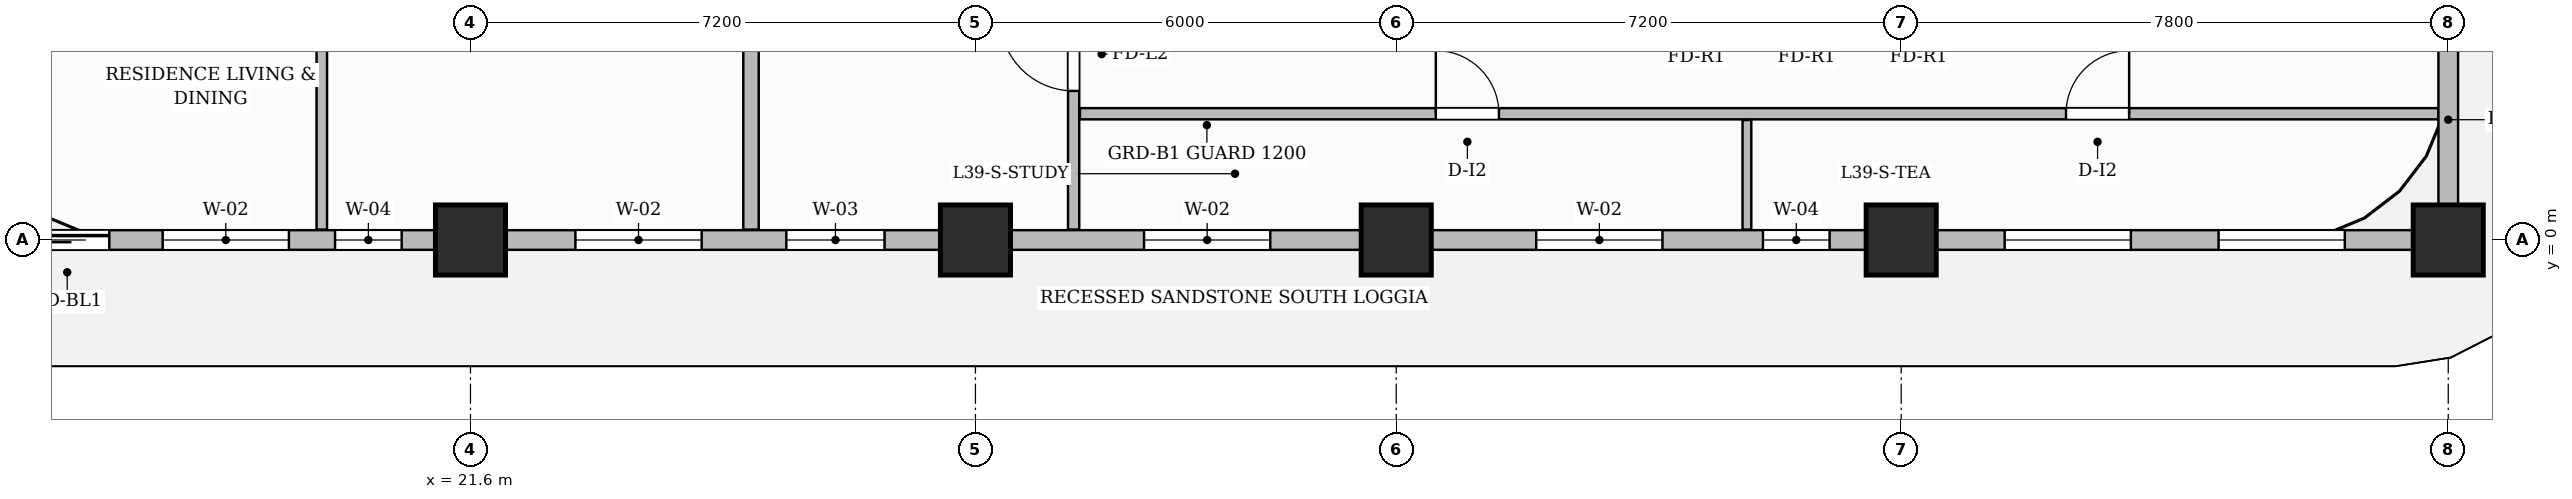
"""IFC4 building model, lengths in metres.
Left out: names, types, materials, properties, quantities, classifications, styles, units other than length and angle.
Written with IfcOpenShell. Run it as: python <this file> out.ifc"""

import sys

from ifc_helpers import new_model, si_unit, direction, frame, frame_2d, origin, origin_2d, place, context, subcontext, project, spatial, rectangle, extrude, source, transform, mapped, element, fill, save


model = new_model("IFC4")
c1 = context("Model", 3, precision=1e-05, world=origin(), true_north=direction((0.0, 1.0)))
c2 = subcontext(c1, "Body", "Model", "MODEL_VIEW")
j1 = project(units=[si_unit("LENGTHUNIT", "METRE"), si_unit("PLANEANGLEUNIT", "RADIAN")], contexts=[c1])
p1 = place(None, origin())
s1 = spatial("IfcSite", under=j1, at=p1, CompositionType="ELEMENT")
p2 = place(p1, origin())
s2 = spatial("IfcBuilding", under=s1, at=p2, CompositionType="ELEMENT")
p3 = place(p2, frame((0.0, 0.0, 158.0)))
s3 = spatial("IfcBuildingStorey", under=s2, at=p3, CompositionType="ELEMENT", Elevation=158.0)
m1 = source(origin(), c2, "Body", "SweptSolid", [
    extrude(rectangle(XDim=1.0, YDim=1.0, at=origin_2d()), origin(), (0.0, 0.0, 1.0), 3.85),
])
for number, where, z_axis, x_axis in (
    (1, (21.6, 0.0, 0.0), (0.0, 0.0, 1.0), (1.0, 0.0, 0.0)),
    (2, (28.8, 0.0, 0.0), (0.0, 0.0, 1.0), (1.0, 0.0, 0.0)),
    (3, (34.8, 0.0, 0.0), (0.0, 0.0, 1.0), (1.0, 0.0, 0.0)),
    (4, (42.0, 0.0, 0.0), (0.0, 0.0, 1.0), (1.0, 0.0, 0.0)),
    (5, (49.8, 0.0, 0.0), (0.0, 0.0, 1.0), (1.0, 0.0, 0.0)),
):
    element("IfcColumn", number, at=place(p3, frame(where, z_axis=z_axis, x_axis=x_axis)), inside=s3, PredefinedType="COLUMN", context=c2, shape_type="MappedRepresentation", body=[
        mapped(m1, transform((0.0, 0.0, 0.0), scale=1.0)),
    ])
p4 = place(p3, frame((30.2, 0.148, 0.0), z_axis=(0.0, 0.0, 1.0), x_axis=(0.0, 1.0, 0.0)))
e6 = element("IfcWall", 6, at=p4, inside=s3, PredefinedType="PARTITIONING", context=c2, shape_type="SweptSolid", body=[
    extrude(rectangle(XDim=9.712, YDim=0.16, at=frame_2d((4.856, 0.0))), origin(), (0.0, 0.0, 1.0), 3.6),
])
p5 = place(p4, frame((1.977, 0.0, 0.0)))
e7 = element("IfcOpeningElement", 7, at=p5, cuts=e6, PredefinedType="OPENING", context=c2, shape_type="SweptSolid", body=[
    extrude(rectangle(XDim=1.05, YDim=2.15, at=frame_2d((0.525, 1.075))), frame((0.0, 0.09, 0.0), z_axis=(0.0, -1.0, 0.0), x_axis=(1.0, 0.0, 0.0)), (0.0, 0.0, 1.0), 0.18),
])
p6 = place(p3, frame((30.29, 1.8, 0.0), z_axis=(0.0, 0.0, 1.0), x_axis=(1.0, 0.0, 0.0)))
e8 = element("IfcWall", 8, at=p6, inside=s3, PredefinedType="PARTITIONING", context=c2, shape_type="SweptSolid", body=[
    extrude(rectangle(XDim=19.37, YDim=0.16, at=frame_2d((9.685, 0.0))), origin(), (0.0, 0.0, 1.0), 3.6),
])
p7 = place(p6, frame((5.074, 0.0, 0.0)))
e9 = element("IfcOpeningElement", 9, at=p7, cuts=e8, PredefinedType="OPENING", context=c2, shape_type="SweptSolid", body=[
    extrude(rectangle(XDim=0.9, YDim=2.15, at=frame_2d((0.45, 1.075))), frame((0.0, 0.09, 0.0), z_axis=(0.0, -1.0, 0.0), x_axis=(1.0, 0.0, 0.0)), (0.0, 0.0, 1.0), 0.18),
])
p8 = place(p6, frame((14.06, 0.0, 0.0)))
e10 = element("IfcOpeningElement", 10, at=p8, cuts=e8, PredefinedType="OPENING", context=c2, shape_type="SweptSolid", body=[
    extrude(rectangle(XDim=0.9, YDim=2.15, at=frame_2d((0.45, 1.075))), frame((0.0, 0.09, 0.0), z_axis=(0.0, -1.0, 0.0), x_axis=(1.0, 0.0, 0.0)), (0.0, 0.0, 1.0), 0.18),
])
p9 = place(p3, frame((39.8, 0.148, 0.0), z_axis=(0.0, 0.0, 1.0), x_axis=(0.0, 1.0, 0.0)))
e11 = element("IfcWall", 11, at=p9, inside=s3, PredefinedType="PARTITIONING", context=c2, shape_type="SweptSolid", body=[
    extrude(rectangle(XDim=1.562, YDim=0.125, at=frame_2d((0.781, 0.0))), origin(), (0.0, 0.0, 1.0), 3.6),
])
p10 = place(p3, frame((25.6, 0.148, 0.0), z_axis=(0.0, 0.0, 1.0), x_axis=(0.0, 1.0, 0.0)))
e12 = element("IfcWall", 12, at=p10, inside=s3, PredefinedType="PARTITIONING", context=c2, shape_type="SweptSolid", body=[
    extrude(rectangle(XDim=9.712, YDim=0.22, at=frame_2d((4.856, 0.0))), origin(), (0.0, 0.0, 1.0), 3.6),
])
p11 = place(p3, frame((19.48, 0.148, 0.0), z_axis=(0.0, 0.0, 1.0), x_axis=(0.0, 1.0, 0.0)))
e13 = element("IfcWall", 13, at=p11, inside=s3, PredefinedType="PARTITIONING", context=c2, shape_type="SweptSolid", body=[
    extrude(rectangle(XDim=9.712, YDim=0.15, at=frame_2d((4.856, 0.0))), origin(), (0.0, 0.0, 1.0), 3.6),
])
p12 = place(p11, frame((8.277, 0.0, 0.0)))
e14 = element("IfcOpeningElement", 14, at=p12, cuts=e13, PredefinedType="OPENING", context=c2, shape_type="SweptSolid", body=[
    extrude(rectangle(XDim=0.9, YDim=2.15, at=frame_2d((0.45, 1.075))), frame((0.0, 0.085, 0.0), z_axis=(0.0, -1.0, 0.0), x_axis=(1.0, 0.0, 0.0)), (0.0, 0.0, 1.0), 0.17),
])
p13 = place(p3, frame((14.4, 0.0, 0.0), z_axis=(0.0, 0.0, 1.0), x_axis=(1.0, 0.0, 0.0)))
e15 = element("IfcWall", 15, at=p13, inside=s3, PredefinedType="SOLIDWALL", context=c2, shape_type="SweptSolid", body=[
    extrude(rectangle(XDim=35.4, YDim=0.28, at=frame_2d((17.7, 0.0))), origin(), (0.0, 0.0, 1.0), 3.085),
])
p14 = place(p13, frame((0.85, 0.0, 0.0)))
e16 = element("IfcOpeningElement", 16, at=p14, cuts=e15, PredefinedType="OPENING", context=c2, shape_type="SweptSolid", body=[
    extrude(rectangle(XDim=1.2, YDim=2.2, at=frame_2d((0.6, 1.1))), frame((0.0, 0.15, 0.0), z_axis=(0.0, -1.0, 0.0), x_axis=(1.0, 0.0, 0.0)), (0.0, 0.0, 1.0), 0.3),
])
p15 = place(p13, frame((2.811, 0.0, 0.8)))
e17 = element("IfcOpeningElement", 17, at=p15, cuts=e15, PredefinedType="OPENING", context=c2, shape_type="SweptSolid", body=[
    extrude(rectangle(XDim=1.8, YDim=1.85, at=frame_2d((0.9, 0.925))), frame((0.0, 0.15, 0.0), z_axis=(0.0, -1.0, 0.0), x_axis=(1.0, 0.0, 0.0)), (0.0, 0.0, 1.0), 0.3),
])
p16 = place(p13, frame((5.269, 0.0, 0.8)))
e18 = element("IfcOpeningElement", 18, at=p16, cuts=e15, PredefinedType="OPENING", context=c2, shape_type="SweptSolid", body=[
    extrude(rectangle(XDim=0.95, YDim=1.75, at=frame_2d((0.475, 0.875))), frame((0.0, 0.15, 0.0), z_axis=(0.0, -1.0, 0.0), x_axis=(1.0, 0.0, 0.0)), (0.0, 0.0, 1.0), 0.3),
])
p17 = place(p13, frame((8.696, 0.0, 0.8)))
e19 = element("IfcOpeningElement", 19, at=p17, cuts=e15, PredefinedType="OPENING", context=c2, shape_type="SweptSolid", body=[
    extrude(rectangle(XDim=1.8, YDim=1.85, at=frame_2d((0.9, 0.925))), frame((0.0, 0.15, 0.0), z_axis=(0.0, -1.0, 0.0), x_axis=(1.0, 0.0, 0.0)), (0.0, 0.0, 1.0), 0.3),
])
p18 = place(p13, frame((11.704, 0.0, 0.8)))
e20 = element("IfcOpeningElement", 20, at=p18, cuts=e15, PredefinedType="OPENING", context=c2, shape_type="SweptSolid", body=[
    extrude(rectangle(XDim=1.4, YDim=1.85, at=frame_2d((0.7, 0.925))), frame((0.0, 0.15, 0.0), z_axis=(0.0, -1.0, 0.0), x_axis=(1.0, 0.0, 0.0)), (0.0, 0.0, 1.0), 0.3),
])
p19 = place(p13, frame((16.804, 0.0, 0.8)))
e21 = element("IfcOpeningElement", 21, at=p19, cuts=e15, PredefinedType="OPENING", context=c2, shape_type="SweptSolid", body=[
    extrude(rectangle(XDim=1.8, YDim=1.85, at=frame_2d((0.9, 0.925))), frame((0.0, 0.15, 0.0), z_axis=(0.0, -1.0, 0.0), x_axis=(1.0, 0.0, 0.0)), (0.0, 0.0, 1.0), 0.3),
])
p20 = place(p13, frame((22.396, 0.0, 0.8)))
e22 = element("IfcOpeningElement", 22, at=p20, cuts=e15, PredefinedType="OPENING", context=c2, shape_type="SweptSolid", body=[
    extrude(rectangle(XDim=1.8, YDim=1.85, at=frame_2d((0.9, 0.925))), frame((0.0, 0.15, 0.0), z_axis=(0.0, -1.0, 0.0), x_axis=(1.0, 0.0, 0.0)), (0.0, 0.0, 1.0), 0.3),
])
p21 = place(p13, frame((25.629, 0.0, 0.8)))
e23 = element("IfcOpeningElement", 23, at=p21, cuts=e15, PredefinedType="OPENING", context=c2, shape_type="SweptSolid", body=[
    extrude(rectangle(XDim=0.95, YDim=1.75, at=frame_2d((0.475, 0.875))), frame((0.0, 0.15, 0.0), z_axis=(0.0, -1.0, 0.0), x_axis=(1.0, 0.0, 0.0)), (0.0, 0.0, 1.0), 0.3),
])
p22 = place(p13, frame((29.075, 0.0, 0.8)))
e24 = element("IfcOpeningElement", 24, at=p22, cuts=e15, PredefinedType="OPENING", context=c2, shape_type="SweptSolid", body=[
    extrude(rectangle(XDim=1.8, YDim=1.85, at=frame_2d((0.9, 0.925))), frame((0.0, 0.15, 0.0), z_axis=(0.0, -1.0, 0.0), x_axis=(1.0, 0.0, 0.0)), (0.0, 0.0, 1.0), 0.3),
])
p23 = place(p13, frame((32.125, 0.0, 0.8)))
e25 = element("IfcOpeningElement", 25, at=p23, cuts=e15, PredefinedType="OPENING", context=c2, shape_type="SweptSolid", body=[
    extrude(rectangle(XDim=1.8, YDim=1.85, at=frame_2d((0.9, 0.925))), frame((0.0, 0.15, 0.0), z_axis=(0.0, -1.0, 0.0), x_axis=(1.0, 0.0, 0.0)), (0.0, 0.0, 1.0), 0.3),
])
p24 = place(p3, frame((49.8, 0.05, 0.0), z_axis=(0.0, 0.0, 1.0), x_axis=(0.0, 1.0, 0.0)))
e26 = element("IfcWall", 26, at=p24, inside=s3, PredefinedType="SOLIDWALL", context=c2, shape_type="SweptSolid", body=[
    extrude(rectangle(XDim=3.33, YDim=0.28, at=frame_2d((1.665, 0.0))), origin(), (0.0, 0.0, 1.0), 3.6),
])
m2 = source(origin(), c2, "Body", "SweptSolid", [
    extrude(rectangle(XDim=1.05, YDim=2.15, at=frame_2d((0.525, 1.075))), frame((0.0, 0.025, 0.0), z_axis=(0.0, -1.0, 0.0), x_axis=(1.0, 0.0, 0.0)), (0.0, 0.0, 1.0), 0.05),
])
p25 = place(p5, origin())
e27 = element("IfcDoor", 27, at=p25, inside=s3, OperationType="SINGLE_SWING_RIGHT", PredefinedType="DOOR", context=c2, shape_type="MappedRepresentation", body=[
    mapped(m2, transform((0.0, 0.0, 0.0), scale=1.0)),
])
fill(e7, e27)
m3 = source(origin(), c2, "Body", "SweptSolid", [
    extrude(rectangle(XDim=0.9, YDim=2.15, at=frame_2d((0.45, 1.075))), frame((0.0, 0.025, 0.0), z_axis=(0.0, -1.0, 0.0), x_axis=(1.0, 0.0, 0.0)), (0.0, 0.0, 1.0), 0.05),
])
p26 = place(p7, origin())
e28 = element("IfcDoor", 28, at=p26, inside=s3, OperationType="SINGLE_SWING_LEFT", PredefinedType="DOOR", context=c2, shape_type="MappedRepresentation", body=[
    mapped(m3, transform((0.0, 0.0, 0.0), scale=1.0)),
])
fill(e9, e28)
p27 = place(p8, origin())
e29 = element("IfcDoor", 29, at=p27, inside=s3, OperationType="SINGLE_SWING_RIGHT", PredefinedType="DOOR", context=c2, shape_type="MappedRepresentation", body=[
    mapped(m3, transform((0.0, 0.0, 0.0), scale=1.0)),
])
fill(e10, e29)
m4 = source(origin(), c2, "Body", "SweptSolid", [
    extrude(rectangle(XDim=1.2, YDim=2.2, at=frame_2d((0.6, 1.1))), frame((0.0, 0.025, 0.0), z_axis=(0.0, -1.0, 0.0), x_axis=(1.0, 0.0, 0.0)), (0.0, 0.0, 1.0), 0.05),
])
p28 = place(p14, origin())
e30 = element("IfcDoor", 30, at=p28, inside=s3, OperationType="SLIDING_TO_LEFT", PredefinedType="DOOR", context=c2, shape_type="MappedRepresentation", body=[
    mapped(m4, transform((0.0, 0.0, 0.0), scale=1.0)),
])
fill(e16, e30)
m5 = source(origin(), c2, "Body", "SweptSolid", [
    extrude(rectangle(XDim=1.8, YDim=1.85, at=frame_2d((0.9, 0.925))), frame((0.0, 0.03, 0.0), z_axis=(0.0, -1.0, 0.0), x_axis=(1.0, 0.0, 0.0)), (0.0, 0.0, 1.0), 0.06),
])
p29 = place(p15, origin())
e31 = element("IfcWindow", 31, at=p29, inside=s3, PartitioningType="DOUBLE_PANEL_VERTICAL", PredefinedType="WINDOW", context=c2, shape_type="MappedRepresentation", body=[
    mapped(m5, transform((0.0, 0.0, 0.0), scale=1.0)),
])
fill(e17, e31)
m6 = source(origin(), c2, "Body", "SweptSolid", [
    extrude(rectangle(XDim=0.95, YDim=1.75, at=frame_2d((0.475, 0.875))), frame((0.0, 0.03, 0.0), z_axis=(0.0, -1.0, 0.0), x_axis=(1.0, 0.0, 0.0)), (0.0, 0.0, 1.0), 0.06),
])
p30 = place(p16, origin())
e32 = element("IfcWindow", 32, at=p30, inside=s3, PartitioningType="SINGLE_PANEL", PredefinedType="WINDOW", context=c2, shape_type="MappedRepresentation", body=[
    mapped(m6, transform((0.0, 0.0, 0.0), scale=1.0)),
])
fill(e18, e32)
p31 = place(p17, origin())
e33 = element("IfcWindow", 33, at=p31, inside=s3, PartitioningType="DOUBLE_PANEL_VERTICAL", PredefinedType="WINDOW", context=c2, shape_type="MappedRepresentation", body=[
    mapped(m5, transform((0.0, 0.0, 0.0), scale=1.0)),
])
fill(e19, e33)
m7 = source(origin(), c2, "Body", "SweptSolid", [
    extrude(rectangle(XDim=1.4, YDim=1.85, at=frame_2d((0.7, 0.925))), frame((0.0, 0.03, 0.0), z_axis=(0.0, -1.0, 0.0), x_axis=(1.0, 0.0, 0.0)), (0.0, 0.0, 1.0), 0.06),
])
p32 = place(p18, origin())
e34 = element("IfcWindow", 34, at=p32, inside=s3, PartitioningType="SINGLE_PANEL", PredefinedType="WINDOW", context=c2, shape_type="MappedRepresentation", body=[
    mapped(m7, transform((0.0, 0.0, 0.0), scale=1.0)),
])
fill(e20, e34)
p33 = place(p19, origin())
e35 = element("IfcWindow", 35, at=p33, inside=s3, PartitioningType="DOUBLE_PANEL_VERTICAL", PredefinedType="WINDOW", context=c2, shape_type="MappedRepresentation", body=[
    mapped(m5, transform((0.0, 0.0, 0.0), scale=1.0)),
])
fill(e21, e35)
p34 = place(p20, origin())
e36 = element("IfcWindow", 36, at=p34, inside=s3, PartitioningType="DOUBLE_PANEL_VERTICAL", PredefinedType="WINDOW", context=c2, shape_type="MappedRepresentation", body=[
    mapped(m5, transform((0.0, 0.0, 0.0), scale=1.0)),
])
fill(e22, e36)
p35 = place(p21, origin())
e37 = element("IfcWindow", 37, at=p35, inside=s3, PartitioningType="SINGLE_PANEL", PredefinedType="WINDOW", context=c2, shape_type="MappedRepresentation", body=[
    mapped(m6, transform((0.0, 0.0, 0.0), scale=1.0)),
])
fill(e23, e37)
p36 = place(p22, origin())
e38 = element("IfcWindow", 38, at=p36, inside=s3, PartitioningType="DOUBLE_PANEL_VERTICAL", PredefinedType="WINDOW", context=c2, shape_type="MappedRepresentation", body=[
    mapped(m5, transform((0.0, 0.0, 0.0), scale=1.0)),
])
fill(e24, e38)
p37 = place(p23, origin())
e39 = element("IfcWindow", 39, at=p37, inside=s3, PartitioningType="DOUBLE_PANEL_VERTICAL", PredefinedType="WINDOW", context=c2, shape_type="MappedRepresentation", body=[
    mapped(m5, transform((0.0, 0.0, 0.0), scale=1.0)),
])
fill(e25, e39)
save(model, sys.argv[1])
